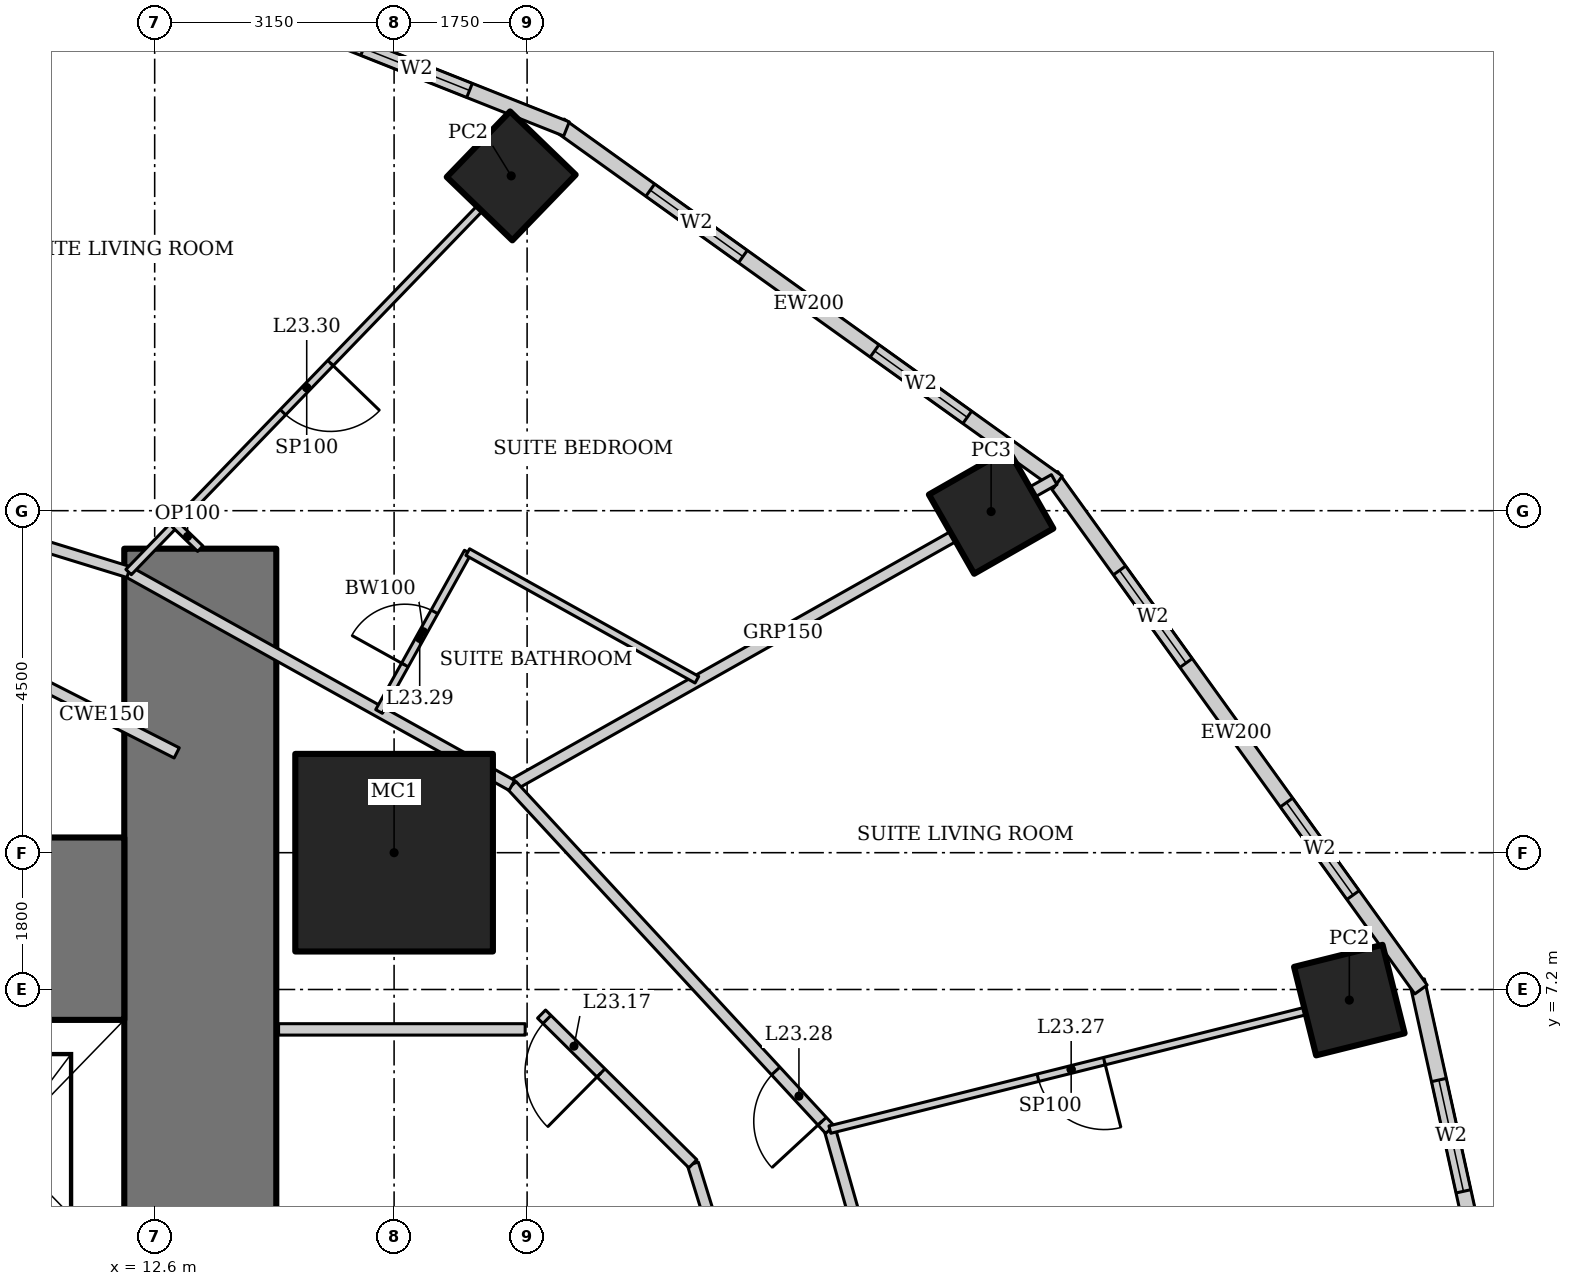
"""IFC4 building model, lengths in metres.
Left out: names, types, materials, properties, quantities, classifications, styles, units other than length and angle.
Written with IfcOpenShell. Run it as: python <this file> out.ifc"""

import sys

from ifc_helpers import new_model, si_unit, direction, frame, frame_2d, origin, origin_2d, place, context, subcontext, project, spatial, rectangle, hollow_rectangle, extrude, element, fill, save


model = new_model("IFC4")
c1 = context("Model", 3, precision=1e-05, world=origin(), true_north=direction((0.0, 1.0)))
c2 = subcontext(c1, "Body", "Model", "MODEL_VIEW")
j1 = project(units=[si_unit("LENGTHUNIT", "METRE"), si_unit("PLANEANGLEUNIT", "RADIAN")], contexts=[c1])
p1 = place(None, origin())
s1 = spatial("IfcSite", under=j1, at=p1, CompositionType="ELEMENT")
p2 = place(p1, origin())
s2 = spatial("IfcBuilding", under=s1, at=p2, CompositionType="ELEMENT")
p3 = place(p2, frame((0.0, 0.0, 98.2)))
s3 = spatial("IfcBuildingStorey", under=s2, at=p3, CompositionType="ELEMENT", Elevation=98.2)
p4 = place(p3, frame((15.75, 9.0, 0.0), z_axis=(0.0, 0.0, 1.0), x_axis=(1.0, 0.0, 0.0)))
e1 = element("IfcColumn", 1, at=p4, inside=s3, PredefinedType="COLUMN", context=c2, shape_type="SweptSolid", body=[
    extrude(hollow_rectangle(XDim=2.6, YDim=2.6, WallThickness=0.13, at=origin_2d()), origin(), (0.0, 0.0, 1.0), 3.6),
])
p5 = place(p3, frame((28.318, 7.06, 0.0), z_axis=(0.0, 0.0, 1.0), x_axis=(0.970295726276, 0.2419218956, 0.0)))
e2 = element("IfcColumn", 2, at=p5, inside=s3, PredefinedType="COLUMN", context=c2, shape_type="SweptSolid", body=[
    extrude(hollow_rectangle(XDim=1.2, YDim=1.2, WallThickness=0.1, at=origin_2d()), origin(), (0.0, 0.0, 1.0), 3.6),
])
p6 = place(p3, frame((23.605, 13.489, 0.0), z_axis=(0.0, 0.0, 1.0), x_axis=(0.86824298017, 0.496139221777, 0.0)))
e3 = element("IfcColumn", 3, at=p6, inside=s3, PredefinedType="COLUMN", context=c2, shape_type="SweptSolid", body=[
    extrude(hollow_rectangle(XDim=1.2, YDim=1.2, WallThickness=0.12, at=origin_2d()), origin(), (0.0, 0.0, 1.0), 3.6),
])
p7 = place(p3, frame((17.291, 17.905, 0.0), z_axis=(0.0, 0.0, 1.0), x_axis=(0.694658370459, 0.719339800339, 0.0)))
e4 = element("IfcColumn", 4, at=p7, inside=s3, PredefinedType="COLUMN", context=c2, shape_type="SweptSolid", body=[
    extrude(hollow_rectangle(XDim=1.2, YDim=1.2, WallThickness=0.1, at=origin_2d()), origin(), (0.0, 0.0, 1.0), 3.6),
])
p8 = place(p3, frame((13.2, -13.0, 0.0), z_axis=(0.0, 0.0, 1.0), x_axis=(0.0, 1.0, 0.0)))
e5 = element("IfcWall", 5, at=p8, inside=s3, PredefinedType="SHEAR", context=c2, shape_type="SweptSolid", body=[
    extrude(rectangle(XDim=26.0, YDim=2.0, at=frame_2d((13.0, 0.0))), origin(), (0.0, 0.0, 1.0), 3.6),
])
p9 = place(p8, frame((12.1, 0.0, 0.0)))
e6 = element("IfcOpeningElement", 6, at=p9, cuts=e5, PredefinedType="OPENING", context=c2, shape_type="SweptSolid", body=[
    extrude(rectangle(XDim=1.8, YDim=2.1, at=frame_2d((0.9, 1.05))), frame((0.0, 1.01, 0.0), z_axis=(0.0, -1.0, 0.0), x_axis=(1.0, 0.0, 0.0)), (0.0, 0.0, 1.0), 2.02),
])
p10 = place(p3, frame((12.2, 8.0, 0.0), z_axis=(0.0, 0.0, 1.0), x_axis=(-1.0, 0.0, 0.0)))
e7 = element("IfcWall", 7, at=p10, inside=s3, PredefinedType="SHEAR", context=c2, shape_type="SweptSolid", body=[
    extrude(rectangle(XDim=24.4, YDim=2.4, at=frame_2d((12.2, 0.0))), origin(), (0.0, 0.0, 1.0), 3.6),
])
p11 = place(p3, frame((30.835, -0.067, 0.0), z_axis=(0.0, 0.0, 1.0), x_axis=(-0.215238065514, 0.976561608478, 0.0)))
e8 = element("IfcWall", 8, at=p11, inside=s3, PredefinedType="SOLIDWALL", context=c2, shape_type="SweptSolid", body=[
    extrude(rectangle(XDim=7.562, YDim=0.2, at=frame_2d((3.781, 0.0))), origin(), (0.0, 0.0, 1.0), 3.45),
])
p12 = place(p11, frame((1.341, 0.0, 0.5)))
e9 = element("IfcOpeningElement", 9, at=p12, cuts=e8, PredefinedType="OPENING", context=c2, shape_type="SweptSolid", body=[
    extrude(rectangle(XDim=1.5, YDim=2.2, at=frame_2d((0.75, 1.1))), frame((0.0, 0.11, 0.0), z_axis=(0.0, -1.0, 0.0), x_axis=(1.0, 0.0, 0.0)), (0.0, 0.0, 1.0), 0.22),
])
p13 = place(p11, frame((4.722, 0.0, 0.5)))
e10 = element("IfcOpeningElement", 10, at=p13, cuts=e8, PredefinedType="OPENING", context=c2, shape_type="SweptSolid", body=[
    extrude(rectangle(XDim=1.5, YDim=2.2, at=frame_2d((0.75, 1.1))), frame((0.0, 0.11, 0.0), z_axis=(0.0, -1.0, 0.0), x_axis=(1.0, 0.0, 0.0)), (0.0, 0.0, 1.0), 0.22),
])
p14 = place(p3, frame((29.26, 7.2, 0.0), z_axis=(0.0, 0.0, 1.0), x_axis=(-0.583937613703, 0.811798536155, 0.0)))
e11 = element("IfcWall", 11, at=p14, inside=s3, PredefinedType="SOLIDWALL", context=c2, shape_type="SweptSolid", body=[
    extrude(rectangle(XDim=8.323, YDim=0.2, at=frame_2d((4.162, 0.0))), origin(), (0.0, 0.0, 1.0), 3.45),
])
p15 = place(p14, frame((1.531, 0.0, 0.5)))
e12 = element("IfcOpeningElement", 12, at=p15, cuts=e11, PredefinedType="OPENING", context=c2, shape_type="SweptSolid", body=[
    extrude(rectangle(XDim=1.5, YDim=2.2, at=frame_2d((0.75, 1.1))), frame((0.0, 0.11, 0.0), z_axis=(0.0, -1.0, 0.0), x_axis=(1.0, 0.0, 0.0)), (0.0, 0.0, 1.0), 0.22),
])
p16 = place(p14, frame((5.292, 0.0, 0.5)))
e13 = element("IfcOpeningElement", 13, at=p16, cuts=e11, PredefinedType="OPENING", context=c2, shape_type="SweptSolid", body=[
    extrude(rectangle(XDim=1.5, YDim=2.2, at=frame_2d((0.75, 1.1))), frame((0.0, 0.11, 0.0), z_axis=(0.0, -1.0, 0.0), x_axis=(1.0, 0.0, 0.0)), (0.0, 0.0, 1.0), 0.22),
])
p17 = place(p3, frame((24.482, 13.875, 0.0), z_axis=(0.0, 0.0, 1.0), x_axis=(-0.812791321576, 0.582554948112, 0.0)))
e14 = element("IfcWall", 14, at=p17, inside=s3, PredefinedType="SOLIDWALL", context=c2, shape_type="SweptSolid", body=[
    extrude(rectangle(XDim=8.063, YDim=0.2, at=frame_2d((4.032, 0.0))), origin(), (0.0, 0.0, 1.0), 3.45),
])
p18 = place(p17, frame((1.466, 0.0, 0.5)))
e15 = element("IfcOpeningElement", 15, at=p18, cuts=e14, PredefinedType="OPENING", context=c2, shape_type="SweptSolid", body=[
    extrude(rectangle(XDim=1.5, YDim=2.2, at=frame_2d((0.75, 1.1))), frame((0.0, 0.11, 0.0), z_axis=(0.0, -1.0, 0.0), x_axis=(1.0, 0.0, 0.0)), (0.0, 0.0, 1.0), 0.22),
])
p19 = place(p17, frame((5.097, 0.0, 0.5)))
e16 = element("IfcOpeningElement", 16, at=p19, cuts=e14, PredefinedType="OPENING", context=c2, shape_type="SweptSolid", body=[
    extrude(rectangle(XDim=1.5, YDim=2.2, at=frame_2d((0.75, 1.1))), frame((0.0, 0.11, 0.0), z_axis=(0.0, -1.0, 0.0), x_axis=(1.0, 0.0, 0.0)), (0.0, 0.0, 1.0), 0.22),
])
p20 = place(p3, frame((18.018, 18.523, 0.0), z_axis=(0.0, 0.0, 1.0), x_axis=(-0.929358351251, 0.369178892895, 0.0)))
e17 = element("IfcWall", 17, at=p20, inside=s3, PredefinedType="SOLIDWALL", context=c2, shape_type="SweptSolid", body=[
    extrude(rectangle(XDim=7.692, YDim=0.2, at=frame_2d((3.846, 0.0))), origin(), (0.0, 0.0, 1.0), 3.45),
])
p21 = place(p20, frame((1.373, 0.0, 0.5)))
e18 = element("IfcOpeningElement", 18, at=p21, cuts=e17, PredefinedType="OPENING", context=c2, shape_type="SweptSolid", body=[
    extrude(rectangle(XDim=1.5, YDim=2.2, at=frame_2d((0.75, 1.1))), frame((0.0, 0.11, 0.0), z_axis=(0.0, -1.0, 0.0), x_axis=(1.0, 0.0, 0.0)), (0.0, 0.0, 1.0), 0.22),
])
p22 = place(p20, frame((4.819, 0.0, 0.5)))
e19 = element("IfcOpeningElement", 19, at=p22, cuts=e17, PredefinedType="OPENING", context=c2, shape_type="SweptSolid", body=[
    extrude(rectangle(XDim=1.5, YDim=2.2, at=frame_2d((0.75, 1.1))), frame((0.0, 0.11, 0.0), z_axis=(0.0, -1.0, 0.0), x_axis=(1.0, 0.0, 0.0)), (0.0, 0.0, 1.0), 0.22),
])
p23 = place(p3, frame((24.435, 13.909, 0.0), z_axis=(0.0, 0.0, 1.0), x_axis=(-0.871075246657, -0.491149584813, 0.0)))
e20 = element("IfcWall", 20, at=p23, inside=s3, PredefinedType="PARTITIONING", context=c2, shape_type="SweptSolid", body=[
    extrude(rectangle(XDim=8.192, YDim=0.15, at=frame_2d((4.096, 0.0))), origin(), (0.0, 0.0, 1.0), 2.693),
])
p24 = place(p3, frame((23.0, 0.0, 0.0), z_axis=(0.0, 0.0, 1.0), x_axis=(-0.272386051236, 0.962188047677, 0.0)))
e21 = element("IfcWall", 21, at=p24, inside=s3, PredefinedType="PARTITIONING", context=c2, shape_type="SweptSolid", body=[
    extrude(rectangle(XDim=5.567, YDim=0.15, at=frame_2d((2.783, 0.0))), origin(), (0.0, 0.0, 1.0), 3.45),
])
p25 = place(p3, frame((21.484, 5.356, 0.0), z_axis=(0.0, 0.0, 1.0), x_axis=(-0.678641806296, 0.734469399463, 0.0)))
e22 = element("IfcWall", 22, at=p25, inside=s3, PredefinedType="PARTITIONING", context=c2, shape_type="SweptSolid", body=[
    extrude(rectangle(XDim=6.166, YDim=0.15, at=frame_2d((3.083, 0.0))), origin(), (0.0, 0.0, 1.0), 3.45),
])
p26 = place(p25, frame((0.15, 0.0, 0.0)))
e23 = element("IfcOpeningElement", 23, at=p26, cuts=e22, PredefinedType="OPENING", context=c2, shape_type="SweptSolid", body=[
    extrude(rectangle(XDim=0.9, YDim=2.1, at=frame_2d((0.45, 1.05))), frame((0.0, 0.085, 0.0), z_axis=(0.0, -1.0, 0.0), x_axis=(1.0, 0.0, 0.0)), (0.0, 0.0, 1.0), 0.17),
])
p27 = place(p3, frame((17.299, 9.885, 0.0), z_axis=(0.0, 0.0, 1.0), x_axis=(-0.873695910579, 0.486472461541, 0.0)))
e24 = element("IfcWall", 24, at=p27, inside=s3, PredefinedType="PARTITIONING", context=c2, shape_type="SweptSolid", body=[
    extrude(rectangle(XDim=5.771, YDim=0.15, at=frame_2d((2.885, 0.0))), origin(), (0.0, 0.0, 1.0), 3.45),
])
p28 = place(p3, frame((12.257, 12.693, 0.0), z_axis=(0.0, 0.0, 1.0), x_axis=(-0.955657956744, 0.294478980085, 0.0)))
e25 = element("IfcWall", 25, at=p28, inside=s3, PredefinedType="PARTITIONING", context=c2, shape_type="SweptSolid", body=[
    extrude(rectangle(XDim=5.236, YDim=0.15, at=frame_2d((2.618, 0.0))), origin(), (0.0, 0.0, 1.0), 3.45),
])
p29 = place(p28, frame((4.186, 0.0, 0.0)))
e26 = element("IfcOpeningElement", 26, at=p29, cuts=e25, PredefinedType="OPENING", context=c2, shape_type="SweptSolid", body=[
    extrude(rectangle(XDim=0.9, YDim=2.1, at=frame_2d((0.45, 1.05))), frame((0.0, 0.085, 0.0), z_axis=(0.0, -1.0, 0.0), x_axis=(1.0, 0.0, 0.0)), (0.0, 0.0, 1.0), 0.17),
])
p30 = place(p3, frame((20.921, 0.9, 0.0), z_axis=(0.0, 0.0, 1.0), x_axis=(-0.295778570807, 0.955256529447, 0.0)))
e27 = element("IfcWall", 27, at=p30, inside=s3, PredefinedType="PARTITIONING", context=c2, shape_type="SweptSolid", body=[
    extrude(rectangle(XDim=4.195, YDim=0.15, at=frame_2d((2.097, 0.0))), origin(), (0.0, 0.0, 1.0), 3.45),
])
p31 = place(p3, frame((27.833, 6.939, 0.0), z_axis=(0.0, 0.0, 1.0), x_axis=(-0.970295936837, -0.241921051083, 0.0)))
e28 = element("IfcWall", 28, at=p31, inside=s3, PredefinedType="PARTITIONING", context=c2, shape_type="SweptSolid", body=[
    extrude(rectangle(XDim=6.543, YDim=0.1, at=frame_2d((3.272, 0.0))), origin(), (0.0, 0.0, 1.0), 2.333),
])
p32 = place(p31, frame((2.822, 0.0, 0.0)))
e29 = element("IfcOpeningElement", 29, at=p32, cuts=e28, PredefinedType="OPENING", context=c2, shape_type="SweptSolid", body=[
    extrude(rectangle(XDim=0.9, YDim=2.1, at=frame_2d((0.45, 1.05))), frame((0.0, 0.06, 0.0), z_axis=(0.0, -1.0, 0.0), x_axis=(1.0, 0.0, 0.0)), (0.0, 0.0, 1.0), 0.12),
])
p33 = place(p3, frame((15.552, 10.858, 0.0), z_axis=(0.0, 0.0, 1.0), x_axis=(0.486445964861, 0.873710663361, 0.0)))
e30 = element("IfcWall", 30, at=p33, inside=s3, PredefinedType="PARTITIONING", context=c2, shape_type="SweptSolid", body=[
    extrude(rectangle(XDim=2.4, YDim=0.1, at=frame_2d((1.2, 0.0))), origin(), (0.0, 0.0, 1.0), 3.45),
])
p34 = place(p33, frame((0.7, 0.0, 0.0)))
e31 = element("IfcOpeningElement", 31, at=p34, cuts=e30, PredefinedType="OPENING", context=c2, shape_type="SweptSolid", body=[
    extrude(rectangle(XDim=0.8, YDim=2.1, at=frame_2d((0.4, 1.05))), frame((0.0, 0.06, 0.0), z_axis=(0.0, -1.0, 0.0), x_axis=(1.0, 0.0, 0.0)), (0.0, 0.0, 1.0), 0.12),
])
p35 = place(p3, frame((16.719, 12.955, 0.0), z_axis=(0.0, 0.0, 1.0), x_axis=(0.873676251648, -0.486507766953, 0.0)))
e32 = element("IfcWall", 32, at=p35, inside=s3, PredefinedType="PARTITIONING", context=c2, shape_type="SweptSolid", body=[
    extrude(rectangle(XDim=3.45, YDim=0.1, at=frame_2d((1.725, 0.0))), origin(), (0.0, 0.0, 1.0), 3.45),
])
p36 = place(p3, frame((16.944, 17.545, 0.0), z_axis=(0.0, 0.0, 1.0), x_axis=(-0.694677175107, -0.719321640426, 0.0)))
e33 = element("IfcWall", 33, at=p36, inside=s3, PredefinedType="PARTITIONING", context=c2, shape_type="SweptSolid", body=[
    extrude(rectangle(XDim=6.746, YDim=0.1, at=frame_2d((3.373, 0.0))), origin(), (0.0, 0.0, 1.0), 2.528),
])
p37 = place(p36, frame((2.923, 0.0, 0.0)))
e34 = element("IfcOpeningElement", 34, at=p37, cuts=e33, PredefinedType="OPENING", context=c2, shape_type="SweptSolid", body=[
    extrude(rectangle(XDim=0.9, YDim=2.1, at=frame_2d((0.45, 1.05))), frame((0.0, 0.06, 0.0), z_axis=(0.0, -1.0, 0.0), x_axis=(1.0, 0.0, 0.0)), (0.0, 0.0, 1.0), 0.12),
])
p38 = place(p3, frame((13.2, 13.0, 0.0), z_axis=(0.0, 0.0, 1.0), x_axis=(-0.719347134512, 0.69465077562, 0.0)))
e35 = element("IfcWall", 35, at=p38, inside=s3, PredefinedType="PARTITIONING", context=c2, shape_type="SweptSolid", body=[
    extrude(rectangle(XDim=0.465, YDim=0.1, at=frame_2d((0.232, 0.0))), origin(), (0.0, 0.0, 1.0), 3.45),
])
p39 = place(p3, frame((19.681, 4.907, 0.0), z_axis=(0.0, 0.0, 1.0), x_axis=(-0.710845937688, 0.70334774676, 0.0)))
e36 = element("IfcWall", 36, at=p39, inside=s3, PredefinedType="PARTITIONING", context=c2, shape_type="SweptSolid", body=[
    extrude(rectangle(XDim=2.8, YDim=0.15, at=frame_2d((1.4, 0.0))), origin(), (0.0, 0.0, 1.0), 3.45),
])
p40 = place(p39, frame((1.7, 0.0, 0.0)))
e37 = element("IfcOpeningElement", 37, at=p40, cuts=e36, PredefinedType="OPENING", context=c2, shape_type="SweptSolid", body=[
    extrude(rectangle(XDim=1.0, YDim=2.1, at=frame_2d((0.5, 1.05))), frame((0.0, 0.085, 0.0), z_axis=(0.0, -1.0, 0.0), x_axis=(1.0, 0.0, 0.0)), (0.0, 0.0, 1.0), 0.17),
])
p41 = place(p3, frame((12.89, 10.313, 0.0), z_axis=(0.0, 0.0, 1.0), x_axis=(-0.891372999417, 0.453270532805, 0.0)))
e38 = element("IfcWall", 38, at=p41, inside=s3, PredefinedType="PARTITIONING", context=c2, shape_type="SweptSolid", body=[
    extrude(rectangle(XDim=2.205, YDim=0.15, at=frame_2d((1.103, 0.0))), origin(), (0.0, 0.0, 1.0), 3.45),
])
p42 = place(p3, frame((17.475, 6.675, 0.0), z_axis=(0.0, 0.0, 1.0), x_axis=(-1.0, 0.0, 0.0)))
e39 = element("IfcWall", 39, at=p42, inside=s3, PredefinedType="PARTITIONING", context=c2, shape_type="SweptSolid", body=[
    extrude(rectangle(XDim=3.245, YDim=0.15, at=frame_2d((1.622, 0.0))), origin(), (0.0, 0.0, 1.0), 3.45),
])
p43 = place(p13, origin())
e40 = element("IfcWindow", 40, at=p43, inside=s3, PartitioningType="SINGLE_PANEL", PredefinedType="WINDOW", context=c2, shape_type="SweptSolid", body=[
    extrude(rectangle(XDim=1.5, YDim=2.2, at=frame_2d((0.75, 1.1))), frame((0.0, 0.03, 0.0), z_axis=(0.0, -1.0, 0.0), x_axis=(1.0, 0.0, 0.0)), (0.0, 0.0, 1.0), 0.06),
])
fill(e10, e40)
p44 = place(p15, origin())
e41 = element("IfcWindow", 41, at=p44, inside=s3, PartitioningType="SINGLE_PANEL", PredefinedType="WINDOW", context=c2, shape_type="SweptSolid", body=[
    extrude(rectangle(XDim=1.5, YDim=2.2, at=frame_2d((0.75, 1.1))), frame((0.0, 0.03, 0.0), z_axis=(0.0, -1.0, 0.0), x_axis=(1.0, 0.0, 0.0)), (0.0, 0.0, 1.0), 0.06),
])
fill(e12, e41)
p45 = place(p16, origin())
e42 = element("IfcWindow", 42, at=p45, inside=s3, PartitioningType="SINGLE_PANEL", PredefinedType="WINDOW", context=c2, shape_type="SweptSolid", body=[
    extrude(rectangle(XDim=1.5, YDim=2.2, at=frame_2d((0.75, 1.1))), frame((0.0, 0.03, 0.0), z_axis=(0.0, -1.0, 0.0), x_axis=(1.0, 0.0, 0.0)), (0.0, 0.0, 1.0), 0.06),
])
fill(e13, e42)
p46 = place(p18, origin())
e43 = element("IfcWindow", 43, at=p46, inside=s3, PartitioningType="SINGLE_PANEL", PredefinedType="WINDOW", context=c2, shape_type="SweptSolid", body=[
    extrude(rectangle(XDim=1.5, YDim=2.2, at=frame_2d((0.75, 1.1))), frame((0.0, 0.03, 0.0), z_axis=(0.0, -1.0, 0.0), x_axis=(1.0, 0.0, 0.0)), (0.0, 0.0, 1.0), 0.06),
])
fill(e15, e43)
p47 = place(p19, origin())
e44 = element("IfcWindow", 44, at=p47, inside=s3, PartitioningType="SINGLE_PANEL", PredefinedType="WINDOW", context=c2, shape_type="SweptSolid", body=[
    extrude(rectangle(XDim=1.5, YDim=2.2, at=frame_2d((0.75, 1.1))), frame((0.0, 0.03, 0.0), z_axis=(0.0, -1.0, 0.0), x_axis=(1.0, 0.0, 0.0)), (0.0, 0.0, 1.0), 0.06),
])
fill(e16, e44)
p48 = place(p21, origin())
e45 = element("IfcWindow", 45, at=p48, inside=s3, PartitioningType="SINGLE_PANEL", PredefinedType="WINDOW", context=c2, shape_type="SweptSolid", body=[
    extrude(rectangle(XDim=1.5, YDim=2.2, at=frame_2d((0.75, 1.1))), frame((0.0, 0.03, 0.0), z_axis=(0.0, -1.0, 0.0), x_axis=(1.0, 0.0, 0.0)), (0.0, 0.0, 1.0), 0.06),
])
fill(e18, e45)
p49 = place(p40, origin())
e46 = element("IfcDoor", 46, at=p49, inside=s3, OperationType="SINGLE_SWING_LEFT", PredefinedType="DOOR", context=c2, shape_type="SweptSolid", body=[
    extrude(rectangle(XDim=1.0, YDim=2.1, at=frame_2d((0.5, 1.05))), frame((0.0, 0.025, 0.0), z_axis=(0.0, -1.0, 0.0), x_axis=(1.0, 0.0, 0.0)), (0.0, 0.0, 1.0), 0.05),
])
fill(e37, e46)
p50 = place(p32, origin())
e47 = element("IfcDoor", 47, at=p50, inside=s3, OperationType="SINGLE_SWING_LEFT", PredefinedType="DOOR", context=c2, shape_type="SweptSolid", body=[
    extrude(rectangle(XDim=0.9, YDim=2.1, at=frame_2d((0.45, 1.05))), frame((0.0, 0.025, 0.0), z_axis=(0.0, -1.0, 0.0), x_axis=(1.0, 0.0, 0.0)), (0.0, 0.0, 1.0), 0.05),
])
fill(e29, e47)
p51 = place(p26, origin())
e48 = element("IfcDoor", 48, at=p51, inside=s3, OperationType="SINGLE_SWING_LEFT", PredefinedType="DOOR", context=c2, shape_type="SweptSolid", body=[
    extrude(rectangle(XDim=0.9, YDim=2.1, at=frame_2d((0.45, 1.05))), frame((0.0, 0.025, 0.0), z_axis=(0.0, -1.0, 0.0), x_axis=(1.0, 0.0, 0.0)), (0.0, 0.0, 1.0), 0.05),
])
fill(e23, e48)
p52 = place(p34, origin())
e49 = element("IfcDoor", 49, at=p52, inside=s3, OperationType="SINGLE_SWING_LEFT", PredefinedType="DOOR", context=c2, shape_type="SweptSolid", body=[
    extrude(rectangle(XDim=0.8, YDim=2.1, at=frame_2d((0.4, 1.05))), frame((0.0, 0.025, 0.0), z_axis=(0.0, -1.0, 0.0), x_axis=(1.0, 0.0, 0.0)), (0.0, 0.0, 1.0), 0.05),
])
fill(e31, e49)
p53 = place(p37, origin())
e50 = element("IfcDoor", 50, at=p53, inside=s3, OperationType="SINGLE_SWING_LEFT", PredefinedType="DOOR", context=c2, shape_type="SweptSolid", body=[
    extrude(rectangle(XDim=0.9, YDim=2.1, at=frame_2d((0.45, 1.05))), frame((0.0, 0.025, 0.0), z_axis=(0.0, -1.0, 0.0), x_axis=(1.0, 0.0, 0.0)), (0.0, 0.0, 1.0), 0.05),
])
fill(e34, e50)
save(model, sys.argv[1])
